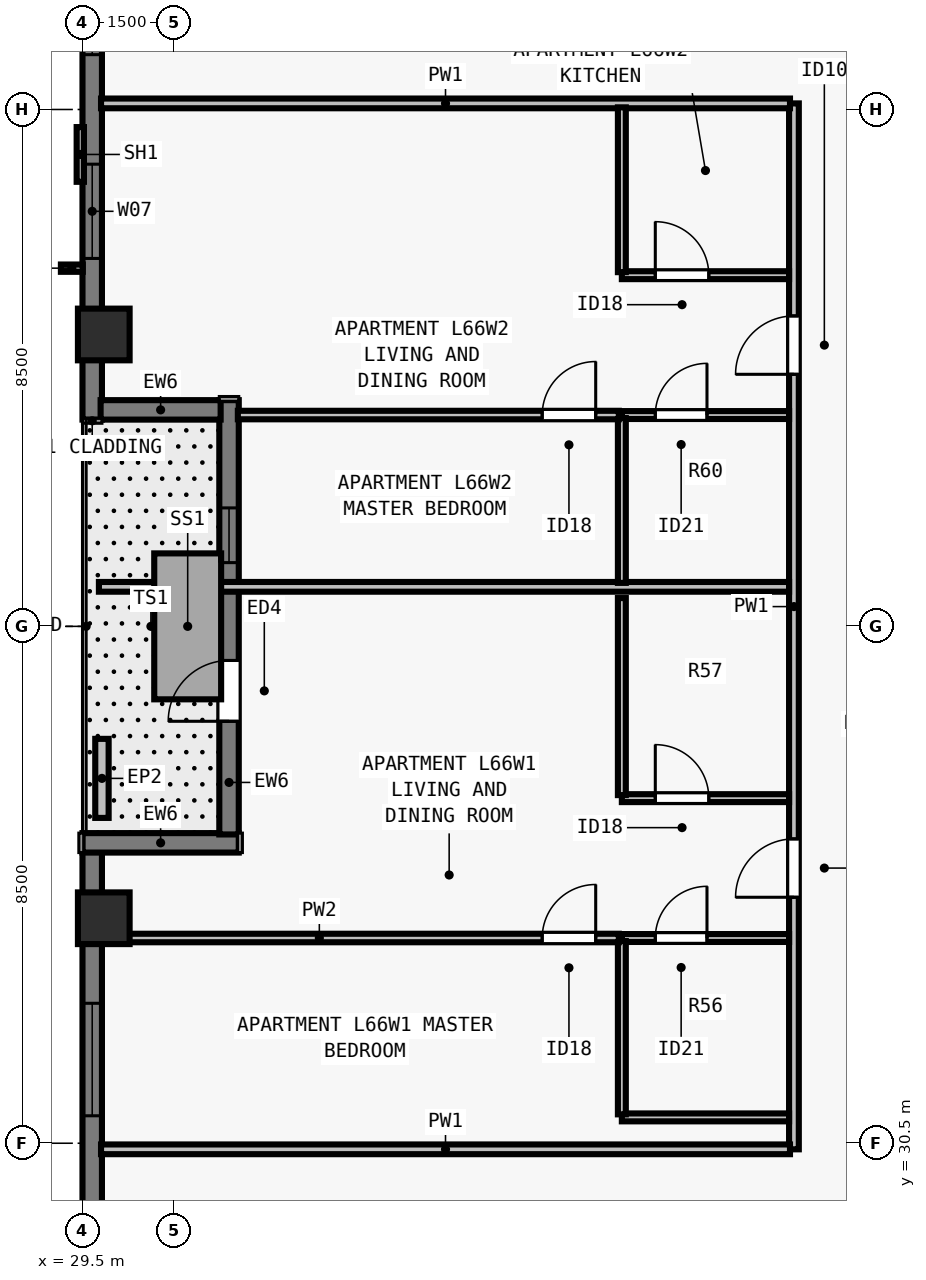
"""IFC4 building model, lengths in metres.
Left out: names, types, materials, properties, quantities, classifications, styles, units other than length and angle.
Written with IfcOpenShell. Run it as: python <this file> out.ifc"""

import sys

from ifc_helpers import new_model, si_unit, direction, frame, frame_2d, origin, origin_2d, place, context, subcontext, project, spatial, rectangle, extrude, element, fill, save


model = new_model("IFC4")
c1 = context("Model", 3, precision=1e-05, world=origin(), true_north=direction((0.0, 1.0)))
c2 = subcontext(c1, "Body", "Model", "MODEL_VIEW")
j1 = project(units=[si_unit("LENGTHUNIT", "METRE"), si_unit("PLANEANGLEUNIT", "RADIAN")], contexts=[c1])
p1 = place(None, origin())
s1 = spatial("IfcSite", under=j1, at=p1, CompositionType="ELEMENT")
p2 = place(p1, origin())
s2 = spatial("IfcBuilding", under=s1, at=p2, CompositionType="ELEMENT")
p3 = place(p2, frame((0.0, 0.0, 241.0)))
s3 = spatial("IfcBuildingStorey", under=s2, at=p3, CompositionType="ELEMENT", Elevation=241.0)
for number, where, z_axis, x_axis in (
    (1, (29.85, 43.8, 0.0), (0.0, 0.0, 1.0), (0.0, 1.0, 0.0)),
    (2, (29.85, 34.2, 0.0), (0.0, 0.0, 1.0), (0.0, 1.0, 0.0)),
):
    element("IfcColumn", number, at=place(p3, frame(where, z_axis=z_axis, x_axis=x_axis)), inside=s3, PredefinedType="COLUMN", context=c2, shape_type="SweptSolid", body=[
        extrude(rectangle(XDim=0.85, YDim=0.85, at=origin_2d()), origin(), (0.0, 0.0, 1.0), 3.5),
    ])
p4 = place(p3, frame((29.66, 42.4, 0.0), z_axis=(0.0, 0.0, 1.0), x_axis=(0.0, 1.0, 0.0)))
e3 = element("IfcWall", 3, at=p4, inside=s3, PredefinedType="SOLIDWALL", context=c2, shape_type="SweptSolid", body=[
    extrude(rectangle(XDim=13.802, YDim=0.32, at=frame_2d((6.901, 0.0))), origin(), (0.0, 0.0, 1.0), 3.29),
])
p5 = place(p4, frame((2.65, 0.0, 0.8)))
e4 = element("IfcOpeningElement", 4, at=p5, cuts=e3, PredefinedType="OPENING", context=c2, shape_type="SweptSolid", body=[
    extrude(rectangle(XDim=1.55, YDim=1.678, at=frame_2d((0.775, 0.839))), frame((0.0, 0.17, 0.0), z_axis=(0.0, -1.0, 0.0), x_axis=(1.0, 0.0, 0.0)), (0.0, 0.0, 1.0), 0.34),
])
p6 = place(p4, frame((6.001, 0.0, 0.8)))
e5 = element("IfcOpeningElement", 5, at=p6, cuts=e3, PredefinedType="OPENING", context=c2, shape_type="SweptSolid", body=[
    extrude(rectangle(XDim=1.85, YDim=1.678, at=frame_2d((0.925, 0.839))), frame((0.0, 0.17, 0.0), z_axis=(0.0, -1.0, 0.0), x_axis=(1.0, 0.0, 0.0)), (0.0, 0.0, 1.0), 0.34),
])
p7 = place(p3, frame((29.66, 21.5, 0.0), z_axis=(0.0, 0.0, 1.0), x_axis=(0.0, 1.0, 0.0)))
e6 = element("IfcWall", 6, at=p7, inside=s3, PredefinedType="SOLIDWALL", context=c2, shape_type="SweptSolid", body=[
    extrude(rectangle(XDim=13.802, YDim=0.32, at=frame_2d((6.901, 0.0))), origin(), (0.0, 0.0, 1.0), 3.29),
])
p8 = place(p7, frame((4.0, 0.0, 0.8)))
e7 = element("IfcOpeningElement", 7, at=p8, cuts=e6, PredefinedType="OPENING", context=c2, shape_type="SweptSolid", body=[
    extrude(rectangle(XDim=1.55, YDim=1.678, at=frame_2d((0.775, 0.839))), frame((0.0, 0.17, 0.0), z_axis=(0.0, -1.0, 0.0), x_axis=(1.0, 0.0, 0.0)), (0.0, 0.0, 1.0), 0.34),
])
p9 = place(p7, frame((9.451, 0.0, 0.8)))
e8 = element("IfcOpeningElement", 8, at=p9, cuts=e6, PredefinedType="OPENING", context=c2, shape_type="SweptSolid", body=[
    extrude(rectangle(XDim=1.85, YDim=1.678, at=frame_2d((0.925, 0.839))), frame((0.0, 0.17, 0.0), z_axis=(0.0, -1.0, 0.0), x_axis=(1.0, 0.0, 0.0)), (0.0, 0.0, 1.0), 0.34),
])
p10 = place(p3, frame((29.5, 35.44, 0.0), z_axis=(0.0, 0.0, 1.0), x_axis=(1.0, 0.0, 0.0)))
e9 = element("IfcWall", 9, at=p10, inside=s3, PredefinedType="SOLIDWALL", context=c2, shape_type="SweptSolid", body=[
    extrude(rectangle(XDim=2.57, YDim=0.32, at=frame_2d((1.285, 0.0))), origin(), (0.0, 0.0, 1.0), 3.29),
])
p11 = place(p3, frame((31.91, 35.578, 0.0), z_axis=(0.0, 0.0, 1.0), x_axis=(0.0, 1.0, 0.0)))
e10 = element("IfcWall", 10, at=p11, inside=s3, PredefinedType="SOLIDWALL", context=c2, shape_type="SweptSolid", body=[
    extrude(rectangle(XDim=7.142, YDim=0.32, at=frame_2d((3.571, 0.0))), origin(), (0.0, 0.0, 1.0), 3.29),
])
p12 = place(p11, frame((1.861, 0.0, 0.0)))
e11 = element("IfcOpeningElement", 11, at=p12, cuts=e10, PredefinedType="OPENING", context=c2, shape_type="SweptSolid", body=[
    extrude(rectangle(XDim=1.0, YDim=2.15, at=frame_2d((0.5, 1.075))), frame((0.0, 0.17, 0.0), z_axis=(0.0, -1.0, 0.0), x_axis=(1.0, 0.0, 0.0)), (0.0, 0.0, 1.0), 0.34),
])
p13 = place(p11, frame((4.47, 0.0, 0.8)))
e12 = element("IfcOpeningElement", 12, at=p13, cuts=e10, PredefinedType="OPENING", context=c2, shape_type="SweptSolid", body=[
    extrude(rectangle(XDim=0.9, YDim=1.678, at=frame_2d((0.45, 0.839))), frame((0.0, 0.17, 0.0), z_axis=(0.0, -1.0, 0.0), x_axis=(1.0, 0.0, 0.0)), (0.0, 0.0, 1.0), 0.34),
])
p14 = place(p3, frame((31.772, 42.56, 0.0), z_axis=(0.0, 0.0, 1.0), x_axis=(-1.0, 0.0, 0.0)))
e13 = element("IfcWall", 13, at=p14, inside=s3, PredefinedType="SOLIDWALL", context=c2, shape_type="SweptSolid", body=[
    extrude(rectangle(XDim=1.974, YDim=0.32, at=frame_2d((0.987, 0.0))), origin(), (0.0, 0.0, 1.0), 3.29),
])
p15 = place(p3, frame((29.82, 35.85, 0.0), z_axis=(0.0, 0.0, 1.0), x_axis=(0.0, 1.0, 0.0)))
e14 = element("IfcWall", 14, at=p15, inside=s3, PredefinedType="PARAPET", context=c2, shape_type="SweptSolid", body=[
    extrude(rectangle(XDim=1.3, YDim=0.22, at=frame_2d((0.65, 0.0))), origin(), (0.0, 0.0, 1.0), 0.55),
])
p16 = place(p3, frame((41.2, 30.4, 0.0), z_axis=(0.0, 0.0, 1.0), x_axis=(0.0, 1.0, 0.0)))
e15 = element("IfcWall", 15, at=p16, inside=s3, PredefinedType="PARTITIONING", context=c2, shape_type="SweptSolid", body=[
    extrude(rectangle(XDim=17.2, YDim=0.16, at=frame_2d((8.6, 0.0))), origin(), (0.0, 0.0, 1.0), 3.29),
])
p17 = place(p16, frame((4.145, 0.0, 0.0)))
e16 = element("IfcOpeningElement", 16, at=p17, cuts=e15, PredefinedType="OPENING", context=c2, shape_type="SweptSolid", body=[
    extrude(rectangle(XDim=0.96, YDim=2.18, at=frame_2d((0.48, 1.09))), frame((0.0, 0.09, 0.0), z_axis=(0.0, -1.0, 0.0), x_axis=(1.0, 0.0, 0.0)), (0.0, 0.0, 1.0), 0.18),
])
p18 = place(p16, frame((12.745, 0.0, 0.0)))
e17 = element("IfcOpeningElement", 17, at=p18, cuts=e15, PredefinedType="OPENING", context=c2, shape_type="SweptSolid", body=[
    extrude(rectangle(XDim=0.96, YDim=2.18, at=frame_2d((0.48, 1.09))), frame((0.0, 0.09, 0.0), z_axis=(0.0, -1.0, 0.0), x_axis=(1.0, 0.0, 0.0)), (0.0, 0.0, 1.0), 0.18),
])
for number, where, z_axis, x_axis in (
    (18, (29.805, 30.4, 0.0), (0.0, 0.0, 1.0), (1.0, 0.0, 0.0)),
    (19, (29.805, 47.6, 0.0), (0.0, 0.0, 1.0), (1.0, 0.0, 0.0)),
):
    element("IfcWall", number, at=place(p3, frame(where, z_axis=z_axis, x_axis=x_axis)), inside=s3, PredefinedType="PARTITIONING", context=c2, shape_type="SweptSolid", body=[
        extrude(rectangle(XDim=11.33, YDim=0.16, at=frame_2d((5.665, 0.0))), origin(), (0.0, 0.0, 1.0), 3.29),
    ])
p19 = place(p3, frame((29.77, 39.65, 0.0), z_axis=(0.0, 0.0, 1.0), x_axis=(1.0, 0.0, 0.0)))
e20 = element("IfcWall", 20, at=p19, inside=s3, PredefinedType="PARTITIONING", context=c2, shape_type="SweptSolid", body=[
    extrude(rectangle(XDim=11.35, YDim=0.16, at=frame_2d((5.675, 0.0))), origin(), (0.0, 0.0, 1.0), 2.958),
])
p20 = place(p3, frame((38.37, 30.925, 0.0), z_axis=(0.0, 0.0, 1.0), x_axis=(1.0, 0.0, 0.0)))
e21 = element("IfcWall", 21, at=p20, inside=s3, PredefinedType="PLUMBINGWALL", context=c2, shape_type="SweptSolid", body=[
    extrude(rectangle(XDim=2.75, YDim=0.13, at=frame_2d((1.375, 0.0))), origin(), (0.0, 0.0, 1.0), 3.29),
])
p21 = place(p3, frame((38.37, 33.875, 0.0), z_axis=(0.0, 0.0, 1.0), x_axis=(1.0, 0.0, 0.0)))
e22 = element("IfcWall", 22, at=p21, inside=s3, PredefinedType="PLUMBINGWALL", context=c2, shape_type="SweptSolid", body=[
    extrude(rectangle(XDim=2.75, YDim=0.13, at=frame_2d((1.375, 0.0))), origin(), (0.0, 0.0, 1.0), 3.29),
])
p22 = place(p21, frame((0.55, 0.0, 0.0)))
e23 = element("IfcOpeningElement", 23, at=p22, cuts=e22, PredefinedType="OPENING", context=c2, shape_type="SweptSolid", body=[
    extrude(rectangle(XDim=0.85, YDim=2.08, at=frame_2d((0.425, 1.04))), frame((0.0, 0.075, 0.0), z_axis=(0.0, -1.0, 0.0), x_axis=(1.0, 0.0, 0.0)), (0.0, 0.0, 1.0), 0.15),
])
p23 = place(p3, frame((38.37, 30.975, 0.0), z_axis=(0.0, 0.0, 1.0), x_axis=(0.0, 1.0, 0.0)))
e24 = element("IfcWall", 24, at=p23, inside=s3, PredefinedType="PLUMBINGWALL", context=c2, shape_type="SweptSolid", body=[
    extrude(rectangle(XDim=2.85, YDim=0.13, at=frame_2d((1.425, 0.0))), origin(), (0.0, 0.0, 1.0), 3.29),
])
p24 = place(p3, frame((38.37, 36.175, 0.0), z_axis=(0.0, 0.0, 1.0), x_axis=(1.0, 0.0, 0.0)))
e25 = element("IfcWall", 25, at=p24, inside=s3, PredefinedType="PLUMBINGWALL", context=c2, shape_type="SweptSolid", body=[
    extrude(rectangle(XDim=2.75, YDim=0.13, at=frame_2d((1.375, 0.0))), origin(), (0.0, 0.0, 1.0), 3.29),
])
p25 = place(p24, frame((0.55, 0.0, 0.0)))
e26 = element("IfcOpeningElement", 26, at=p25, cuts=e25, PredefinedType="OPENING", context=c2, shape_type="SweptSolid", body=[
    extrude(rectangle(XDim=0.88, YDim=2.1, at=frame_2d((0.44, 1.05))), frame((0.0, 0.075, 0.0), z_axis=(0.0, -1.0, 0.0), x_axis=(1.0, 0.0, 0.0)), (0.0, 0.0, 1.0), 0.15),
])
p26 = place(p3, frame((38.37, 36.225, 0.0), z_axis=(0.0, 0.0, 1.0), x_axis=(0.0, 1.0, 0.0)))
e27 = element("IfcWall", 27, at=p26, inside=s3, PredefinedType="PLUMBINGWALL", context=c2, shape_type="SweptSolid", body=[
    extrude(rectangle(XDim=3.24, YDim=0.13, at=frame_2d((1.62, 0.0))), origin(), (0.0, 0.0, 1.0), 3.29),
])
p27 = place(p3, frame((29.88, 33.875, 0.0), z_axis=(0.0, 0.0, 1.0), x_axis=(1.0, 0.0, 0.0)))
e28 = element("IfcWall", 28, at=p27, inside=s3, PredefinedType="PARTITIONING", context=c2, shape_type="SweptSolid", body=[
    extrude(rectangle(XDim=8.44, YDim=0.14, at=frame_2d((4.22, 0.0))), origin(), (0.0, 0.0, 1.0), 2.573),
])
p28 = place(p27, frame((7.18, 0.0, 0.0)))
e29 = element("IfcOpeningElement", 29, at=p28, cuts=e28, PredefinedType="OPENING", context=c2, shape_type="SweptSolid", body=[
    extrude(rectangle(XDim=0.88, YDim=2.1, at=frame_2d((0.44, 1.05))), frame((0.0, 0.08, 0.0), z_axis=(0.0, -1.0, 0.0), x_axis=(1.0, 0.0, 0.0)), (0.0, 0.0, 1.0), 0.16),
])
p29 = place(p3, frame((38.37, 42.475, 0.0), z_axis=(0.0, 0.0, 1.0), x_axis=(1.0, 0.0, 0.0)))
e30 = element("IfcWall", 30, at=p29, inside=s3, PredefinedType="PLUMBINGWALL", context=c2, shape_type="SweptSolid", body=[
    extrude(rectangle(XDim=2.75, YDim=0.13, at=frame_2d((1.375, 0.0))), origin(), (0.0, 0.0, 1.0), 2.958),
])
p30 = place(p29, frame((0.55, 0.0, 0.0)))
e31 = element("IfcOpeningElement", 31, at=p30, cuts=e30, PredefinedType="OPENING", context=c2, shape_type="SweptSolid", body=[
    extrude(rectangle(XDim=0.85, YDim=2.08, at=frame_2d((0.425, 1.04))), frame((0.0, 0.075, 0.0), z_axis=(0.0, -1.0, 0.0), x_axis=(1.0, 0.0, 0.0)), (0.0, 0.0, 1.0), 0.15),
])
p31 = place(p3, frame((38.37, 39.715, 0.0), z_axis=(0.0, 0.0, 1.0), x_axis=(0.0, 1.0, 0.0)))
e32 = element("IfcWall", 32, at=p31, inside=s3, PredefinedType="PLUMBINGWALL", context=c2, shape_type="SweptSolid", body=[
    extrude(rectangle(XDim=2.71, YDim=0.13, at=frame_2d((1.355, 0.0))), origin(), (0.0, 0.0, 1.0), 3.29),
])
p32 = place(p3, frame((38.37, 44.775, 0.0), z_axis=(0.0, 0.0, 1.0), x_axis=(1.0, 0.0, 0.0)))
e33 = element("IfcWall", 33, at=p32, inside=s3, PredefinedType="PLUMBINGWALL", context=c2, shape_type="SweptSolid", body=[
    extrude(rectangle(XDim=2.75, YDim=0.13, at=frame_2d((1.375, 0.0))), origin(), (0.0, 0.0, 1.0), 2.958),
])
p33 = place(p32, frame((0.55, 0.0, 0.0)))
e34 = element("IfcOpeningElement", 34, at=p33, cuts=e33, PredefinedType="OPENING", context=c2, shape_type="SweptSolid", body=[
    extrude(rectangle(XDim=0.88, YDim=2.1, at=frame_2d((0.44, 1.05))), frame((0.0, 0.075, 0.0), z_axis=(0.0, -1.0, 0.0), x_axis=(1.0, 0.0, 0.0)), (0.0, 0.0, 1.0), 0.15),
])
p34 = place(p3, frame((38.37, 44.825, 0.0), z_axis=(0.0, 0.0, 1.0), x_axis=(0.0, 1.0, 0.0)))
e35 = element("IfcWall", 35, at=p34, inside=s3, PredefinedType="PLUMBINGWALL", context=c2, shape_type="SweptSolid", body=[
    extrude(rectangle(XDim=2.71, YDim=0.13, at=frame_2d((1.355, 0.0))), origin(), (0.0, 0.0, 1.0), 3.29),
])
p35 = place(p3, frame((32.055, 42.475, 0.0), z_axis=(0.0, 0.0, 1.0), x_axis=(1.0, 0.0, 0.0)))
e36 = element("IfcWall", 36, at=p35, inside=s3, PredefinedType="PARTITIONING", context=c2, shape_type="SweptSolid", body=[
    extrude(rectangle(XDim=6.265, YDim=0.14, at=frame_2d((3.133, 0.0))), origin(), (0.0, 0.0, 1.0), 3.29),
])
p36 = place(p35, frame((5.005, 0.0, 0.0)))
e37 = element("IfcOpeningElement", 37, at=p36, cuts=e36, PredefinedType="OPENING", context=c2, shape_type="SweptSolid", body=[
    extrude(rectangle(XDim=0.88, YDim=2.1, at=frame_2d((0.44, 1.05))), frame((0.0, 0.08, 0.0), z_axis=(0.0, -1.0, 0.0), x_axis=(1.0, 0.0, 0.0)), (0.0, 0.0, 1.0), 0.16),
])
p37 = place(p5, origin())
e38 = element("IfcWindow", 38, at=p37, inside=s3, PartitioningType="SINGLE_PANEL", PredefinedType="WINDOW", context=c2, shape_type="SweptSolid", body=[
    extrude(rectangle(XDim=1.55, YDim=1.678, at=frame_2d((0.775, 0.839))), frame((0.0, -0.05, 0.0), z_axis=(0.0, -1.0, 0.0), x_axis=(1.0, 0.0, 0.0)), (0.0, 0.0, 1.0), 0.06),
])
fill(e4, e38)
p38 = place(p6, origin())
e39 = element("IfcWindow", 39, at=p38, inside=s3, PartitioningType="SINGLE_PANEL", PredefinedType="WINDOW", context=c2, shape_type="SweptSolid", body=[
    extrude(rectangle(XDim=1.85, YDim=1.678, at=frame_2d((0.925, 0.839))), frame((0.0, -0.05, 0.0), z_axis=(0.0, -1.0, 0.0), x_axis=(1.0, 0.0, 0.0)), (0.0, 0.0, 1.0), 0.06),
])
fill(e5, e39)
p39 = place(p9, origin())
e40 = element("IfcWindow", 40, at=p39, inside=s3, PartitioningType="SINGLE_PANEL", PredefinedType="WINDOW", context=c2, shape_type="SweptSolid", body=[
    extrude(rectangle(XDim=1.85, YDim=1.678, at=frame_2d((0.925, 0.839))), frame((0.0, -0.05, 0.0), z_axis=(0.0, -1.0, 0.0), x_axis=(1.0, 0.0, 0.0)), (0.0, 0.0, 1.0), 0.06),
])
fill(e8, e40)
p40 = place(p12, origin())
e41 = element("IfcDoor", 41, at=p40, inside=s3, OperationType="SINGLE_SWING_LEFT", PredefinedType="DOOR", context=c2, shape_type="SweptSolid", body=[
    extrude(rectangle(XDim=1.0, YDim=2.15, at=frame_2d((0.5, 1.075))), frame((0.0, 0.025, 0.0), z_axis=(0.0, -1.0, 0.0), x_axis=(1.0, 0.0, 0.0)), (0.0, 0.0, 1.0), 0.05),
])
fill(e11, e41)
p41 = place(p13, origin())
e42 = element("IfcWindow", 42, at=p41, inside=s3, PartitioningType="SINGLE_PANEL", PredefinedType="WINDOW", context=c2, shape_type="SweptSolid", body=[
    extrude(rectangle(XDim=0.9, YDim=1.678, at=frame_2d((0.45, 0.839))), frame((0.0, -0.04, 0.0), z_axis=(0.0, -1.0, 0.0), x_axis=(1.0, 0.0, 0.0)), (0.0, 0.0, 1.0), 0.06),
])
fill(e12, e42)
p42 = place(p22, origin())
e43 = element("IfcDoor", 43, at=p42, inside=s3, OperationType="SINGLE_SWING_RIGHT", PredefinedType="DOOR", context=c2, shape_type="SweptSolid", body=[
    extrude(rectangle(XDim=0.85, YDim=2.08, at=frame_2d((0.425, 1.04))), frame((0.0, 0.025, 0.0), z_axis=(0.0, -1.0, 0.0), x_axis=(1.0, 0.0, 0.0)), (0.0, 0.0, 1.0), 0.05),
])
fill(e23, e43)
p43 = place(p25, origin())
e44 = element("IfcDoor", 44, at=p43, inside=s3, OperationType="SINGLE_SWING_LEFT", PredefinedType="DOOR", context=c2, shape_type="SweptSolid", body=[
    extrude(rectangle(XDim=0.88, YDim=2.1, at=frame_2d((0.44, 1.05))), frame((0.0, 0.025, 0.0), z_axis=(0.0, -1.0, 0.0), x_axis=(1.0, 0.0, 0.0)), (0.0, 0.0, 1.0), 0.05),
])
fill(e26, e44)
p44 = place(p28, origin())
e45 = element("IfcDoor", 45, at=p44, inside=s3, OperationType="SINGLE_SWING_RIGHT", PredefinedType="DOOR", context=c2, shape_type="SweptSolid", body=[
    extrude(rectangle(XDim=0.88, YDim=2.1, at=frame_2d((0.44, 1.05))), frame((0.0, 0.025, 0.0), z_axis=(0.0, -1.0, 0.0), x_axis=(1.0, 0.0, 0.0)), (0.0, 0.0, 1.0), 0.05),
])
fill(e29, e45)
p45 = place(p17, origin())
e46 = element("IfcDoor", 46, at=p45, inside=s3, OperationType="SINGLE_SWING_LEFT", PredefinedType="DOOR", context=c2, shape_type="SweptSolid", body=[
    extrude(rectangle(XDim=0.96, YDim=2.18, at=frame_2d((0.48, 1.09))), frame((0.0, 0.025, 0.0), z_axis=(0.0, -1.0, 0.0), x_axis=(1.0, 0.0, 0.0)), (0.0, 0.0, 1.0), 0.05),
])
fill(e16, e46)
p46 = place(p30, origin())
e47 = element("IfcDoor", 47, at=p46, inside=s3, OperationType="SINGLE_SWING_RIGHT", PredefinedType="DOOR", context=c2, shape_type="SweptSolid", body=[
    extrude(rectangle(XDim=0.85, YDim=2.08, at=frame_2d((0.425, 1.04))), frame((0.0, 0.025, 0.0), z_axis=(0.0, -1.0, 0.0), x_axis=(1.0, 0.0, 0.0)), (0.0, 0.0, 1.0), 0.05),
])
fill(e31, e47)
p47 = place(p33, origin())
e48 = element("IfcDoor", 48, at=p47, inside=s3, OperationType="SINGLE_SWING_LEFT", PredefinedType="DOOR", context=c2, shape_type="SweptSolid", body=[
    extrude(rectangle(XDim=0.88, YDim=2.1, at=frame_2d((0.44, 1.05))), frame((0.0, 0.025, 0.0), z_axis=(0.0, -1.0, 0.0), x_axis=(1.0, 0.0, 0.0)), (0.0, 0.0, 1.0), 0.05),
])
fill(e34, e48)
p48 = place(p36, origin())
e49 = element("IfcDoor", 49, at=p48, inside=s3, OperationType="SINGLE_SWING_RIGHT", PredefinedType="DOOR", context=c2, shape_type="SweptSolid", body=[
    extrude(rectangle(XDim=0.88, YDim=2.1, at=frame_2d((0.44, 1.05))), frame((0.0, 0.025, 0.0), z_axis=(0.0, -1.0, 0.0), x_axis=(1.0, 0.0, 0.0)), (0.0, 0.0, 1.0), 0.05),
])
fill(e37, e49)
p49 = place(p18, origin())
e50 = element("IfcDoor", 50, at=p49, inside=s3, OperationType="SINGLE_SWING_LEFT", PredefinedType="DOOR", context=c2, shape_type="SweptSolid", body=[
    extrude(rectangle(XDim=0.96, YDim=2.18, at=frame_2d((0.48, 1.09))), frame((0.0, 0.025, 0.0), z_axis=(0.0, -1.0, 0.0), x_axis=(1.0, 0.0, 0.0)), (0.0, 0.0, 1.0), 0.05),
])
fill(e17, e50)
save(model, sys.argv[1])
